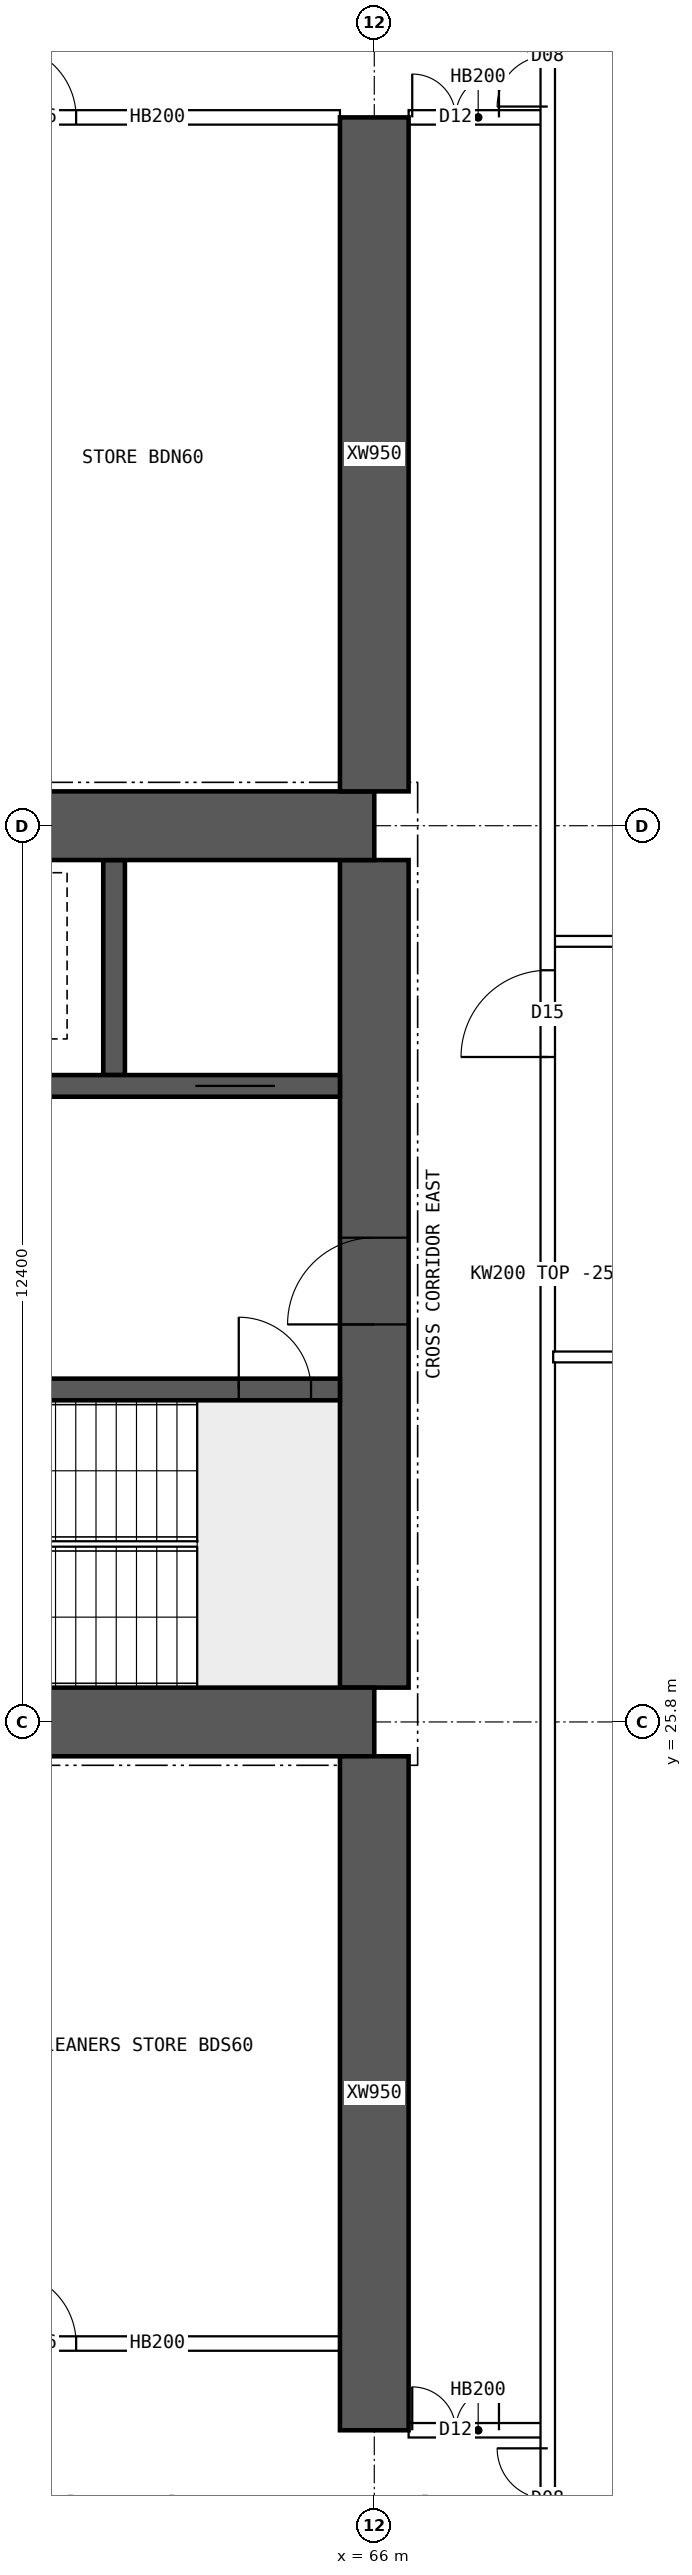
"""IFC4 building model, lengths in metres.
Left out: names, types, materials, properties, quantities, classifications, styles, units other than length and angle.
Written with IfcOpenShell. Run it as: python <this file> out.ifc"""

import sys

from ifc_helpers import new_model, si_unit, direction, frame, frame_2d, origin, place, context, subcontext, project, spatial, polyline, rectangle, outline, extrude, element, fill, save


model = new_model("IFC4")
c1 = context("Model", 3, precision=1e-05, world=origin(), true_north=direction((0.0, 1.0)))
c2 = subcontext(c1, "Body", "Model", "MODEL_VIEW")
j1 = project(units=[si_unit("LENGTHUNIT", "METRE"), si_unit("PLANEANGLEUNIT", "RADIAN")], contexts=[c1])
p1 = place(None, origin())
s1 = spatial("IfcSite", under=j1, at=p1, CompositionType="ELEMENT")
p2 = place(p1, origin())
s2 = spatial("IfcBuilding", under=s1, at=p2, CompositionType="ELEMENT")
p3 = place(p2, frame((0.0, 0.0, 103.15)))
s3 = spatial("IfcBuildingStorey", under=s2, at=p3, CompositionType="ELEMENT", Elevation=103.15)
for number, where, z_axis, x_axis in (
    (1, (18.0, 25.8, 0.0), (0.0, 0.0, 1.0), (1.0, 0.0, 0.0)),
    (2, (18.0, 38.2, 0.0), (0.0, 0.0, 1.0), (1.0, 0.0, 0.0)),
):
    element("IfcWall", number, at=place(p3, frame(where, z_axis=z_axis, x_axis=x_axis)), inside=s3, PredefinedType="SHEAR", context=c2, shape_type="SweptSolid", body=[
        extrude(rectangle(XDim=48.0, YDim=0.95, at=frame_2d((24.0, 0.0))), origin(), (0.0, 0.0, 1.0), 3.75),
    ])
p4 = place(p3, frame((66.0, 26.275, 0.0), z_axis=(0.0, 0.0, 1.0), x_axis=(0.0, 1.0, 0.0)))
e3 = element("IfcWall", 3, at=p4, inside=s3, PredefinedType="SHEAR", context=c2, shape_type="SweptSolid", body=[
    extrude(rectangle(XDim=11.45, YDim=0.95, at=frame_2d((5.725, 0.0))), origin(), (0.0, 0.0, 1.0), 3.75),
])
p5 = place(p4, frame((5.025, 0.0, 0.0)))
e4 = element("IfcOpeningElement", 4, at=p5, cuts=e3, PredefinedType="OPENING", context=c2, shape_type="SweptSolid", body=[
    extrude(rectangle(XDim=1.2, YDim=2.1, at=frame_2d((0.6, 1.05))), frame((0.0, 0.485, 0.0), z_axis=(0.0, -1.0, 0.0), x_axis=(1.0, 0.0, 0.0)), (0.0, 0.0, 1.0), 0.97),
])
p6 = place(p3, frame((18.475, 30.4, 0.0), z_axis=(0.0, 0.0, 1.0), x_axis=(1.0, 0.0, 0.0)))
e5 = element("IfcWall", 5, at=p6, inside=s3, PredefinedType="SHEAR", context=c2, shape_type="SweptSolid", body=[
    extrude(rectangle(XDim=47.05, YDim=0.3, at=frame_2d((23.525, 0.0))), origin(), (0.0, 0.0, 1.0), 3.75),
])
p7 = place(p6, frame((0.4, 0.0, 0.0)))
e6 = element("IfcOpeningElement", 6, at=p7, cuts=e5, PredefinedType="OPENING", context=c2, shape_type="SweptSolid", body=[
    extrude(rectangle(XDim=1.0, YDim=2.1, at=frame_2d((0.5, 1.05))), frame((0.0, 0.16, 0.0), z_axis=(0.0, -1.0, 0.0), x_axis=(1.0, 0.0, 0.0)), (0.0, 0.0, 1.0), 0.32),
])
p8 = place(p6, frame((45.65, 0.0, 0.0)))
e7 = element("IfcOpeningElement", 7, at=p8, cuts=e5, PredefinedType="OPENING", context=c2, shape_type="SweptSolid", body=[
    extrude(rectangle(XDim=1.0, YDim=2.1, at=frame_2d((0.5, 1.05))), frame((0.0, 0.16, 0.0), z_axis=(0.0, -1.0, 0.0), x_axis=(1.0, 0.0, 0.0)), (0.0, 0.0, 1.0), 0.32),
])
p9 = place(p6, frame((8.275, 0.0, 0.0)))
e8 = element("IfcOpeningElement", 8, at=p9, cuts=e5, PredefinedType="OPENING", context=c2, shape_type="SweptSolid", body=[
    extrude(rectangle(XDim=1.1, YDim=2.1, at=frame_2d((0.55, 1.05))), frame((0.0, 0.16, 0.0), z_axis=(0.0, -1.0, 0.0), x_axis=(1.0, 0.0, 0.0)), (0.0, 0.0, 1.0), 0.32),
])
p10 = place(p6, frame((10.875, 0.0, 0.0)))
e9 = element("IfcOpeningElement", 9, at=p10, cuts=e5, PredefinedType="OPENING", context=c2, shape_type="SweptSolid", body=[
    extrude(rectangle(XDim=1.1, YDim=2.1, at=frame_2d((0.55, 1.05))), frame((0.0, 0.16, 0.0), z_axis=(0.0, -1.0, 0.0), x_axis=(1.0, 0.0, 0.0)), (0.0, 0.0, 1.0), 0.32),
])
p11 = place(p6, frame((13.475, 0.0, 0.0)))
e10 = element("IfcOpeningElement", 10, at=p11, cuts=e5, PredefinedType="OPENING", context=c2, shape_type="SweptSolid", body=[
    extrude(rectangle(XDim=1.1, YDim=2.1, at=frame_2d((0.55, 1.05))), frame((0.0, 0.16, 0.0), z_axis=(0.0, -1.0, 0.0), x_axis=(1.0, 0.0, 0.0)), (0.0, 0.0, 1.0), 0.32),
])
p12 = place(p6, frame((16.075, 0.0, 0.0)))
e11 = element("IfcOpeningElement", 11, at=p12, cuts=e5, PredefinedType="OPENING", context=c2, shape_type="SweptSolid", body=[
    extrude(rectangle(XDim=1.1, YDim=2.1, at=frame_2d((0.55, 1.05))), frame((0.0, 0.16, 0.0), z_axis=(0.0, -1.0, 0.0), x_axis=(1.0, 0.0, 0.0)), (0.0, 0.0, 1.0), 0.32),
])
p13 = place(p6, frame((18.85, 0.0, 0.0)))
e12 = element("IfcOpeningElement", 12, at=p13, cuts=e5, PredefinedType="OPENING", context=c2, shape_type="SweptSolid", body=[
    extrude(rectangle(XDim=0.9, YDim=2.1, at=frame_2d((0.45, 1.05))), frame((0.0, 0.16, 0.0), z_axis=(0.0, -1.0, 0.0), x_axis=(1.0, 0.0, 0.0)), (0.0, 0.0, 1.0), 0.32),
])
p14 = place(p6, frame((30.142, 0.0, 0.0)))
e13 = element("IfcOpeningElement", 13, at=p14, cuts=e5, PredefinedType="OPENING", context=c2, shape_type="SweptSolid", body=[
    extrude(rectangle(XDim=1.1, YDim=2.1, at=frame_2d((0.55, 1.05))), frame((0.0, 0.16, 0.0), z_axis=(0.0, -1.0, 0.0), x_axis=(1.0, 0.0, 0.0)), (0.0, 0.0, 1.0), 0.32),
])
p15 = place(p6, frame((33.675, 0.0, 0.0)))
e14 = element("IfcOpeningElement", 14, at=p15, cuts=e5, PredefinedType="OPENING", context=c2, shape_type="SweptSolid", body=[
    extrude(rectangle(XDim=1.1, YDim=2.1, at=frame_2d((0.55, 1.05))), frame((0.0, 0.16, 0.0), z_axis=(0.0, -1.0, 0.0), x_axis=(1.0, 0.0, 0.0)), (0.0, 0.0, 1.0), 0.32),
])
p16 = place(p6, frame((37.208, 0.0, 0.0)))
e15 = element("IfcOpeningElement", 15, at=p16, cuts=e5, PredefinedType="OPENING", context=c2, shape_type="SweptSolid", body=[
    extrude(rectangle(XDim=1.1, YDim=2.1, at=frame_2d((0.55, 1.05))), frame((0.0, 0.16, 0.0), z_axis=(0.0, -1.0, 0.0), x_axis=(1.0, 0.0, 0.0)), (0.0, 0.0, 1.0), 0.32),
])
p17 = place(p3, frame((18.475, 34.6, 0.0), z_axis=(0.0, 0.0, 1.0), x_axis=(1.0, 0.0, 0.0)))
e16 = element("IfcWall", 16, at=p17, inside=s3, PredefinedType="SHEAR", context=c2, shape_type="SweptSolid", body=[
    extrude(rectangle(XDim=47.05, YDim=0.3, at=frame_2d((23.525, 0.0))), origin(), (0.0, 0.0, 1.0), 3.75),
])
p18 = place(p17, frame((0.9, 0.0, 0.0)))
e17 = element("IfcOpeningElement", 17, at=p18, cuts=e16, PredefinedType="OPENING", context=c2, shape_type="SweptSolid", body=[
    extrude(rectangle(XDim=1.1, YDim=2.1, at=frame_2d((0.55, 1.05))), frame((0.0, 0.16, 0.0), z_axis=(0.0, -1.0, 0.0), x_axis=(1.0, 0.0, 0.0)), (0.0, 0.0, 1.0), 0.32),
])
p19 = place(p17, frame((45.05, 0.0, 0.0)))
e18 = element("IfcOpeningElement", 18, at=p19, cuts=e16, PredefinedType="OPENING", context=c2, shape_type="SweptSolid", body=[
    extrude(rectangle(XDim=1.1, YDim=2.1, at=frame_2d((0.55, 1.05))), frame((0.0, 0.16, 0.0), z_axis=(0.0, -1.0, 0.0), x_axis=(1.0, 0.0, 0.0)), (0.0, 0.0, 1.0), 0.32),
])
p20 = place(p17, frame((4.125, 0.0, 0.0)))
e19 = element("IfcOpeningElement", 19, at=p20, cuts=e16, PredefinedType="OPENING", context=c2, shape_type="SweptSolid", body=[
    extrude(rectangle(XDim=0.9, YDim=2.1, at=frame_2d((0.45, 1.05))), frame((0.0, 0.16, 0.0), z_axis=(0.0, -1.0, 0.0), x_axis=(1.0, 0.0, 0.0)), (0.0, 0.0, 1.0), 0.32),
])
p21 = place(p17, frame((42.025, 0.0, 0.0)))
e20 = element("IfcOpeningElement", 20, at=p21, cuts=e16, PredefinedType="OPENING", context=c2, shape_type="SweptSolid", body=[
    extrude(rectangle(XDim=0.9, YDim=2.1, at=frame_2d((0.45, 1.05))), frame((0.0, 0.16, 0.0), z_axis=(0.0, -1.0, 0.0), x_axis=(1.0, 0.0, 0.0)), (0.0, 0.0, 1.0), 0.32),
])
p22 = place(p17, frame((8.9, 0.0, 0.0)))
e21 = element("IfcOpeningElement", 21, at=p22, cuts=e16, PredefinedType="OPENING", context=c2, shape_type="SweptSolid", body=[
    extrude(rectangle(XDim=0.9, YDim=2.1, at=frame_2d((0.45, 1.05))), frame((0.0, 0.16, 0.0), z_axis=(0.0, -1.0, 0.0), x_axis=(1.0, 0.0, 0.0)), (0.0, 0.0, 1.0), 0.32),
])
p23 = place(p17, frame((12.874, 0.0, 0.0)))
e22 = element("IfcOpeningElement", 22, at=p23, cuts=e16, PredefinedType="OPENING", context=c2, shape_type="SweptSolid", body=[
    extrude(rectangle(XDim=0.9, YDim=2.1, at=frame_2d((0.45, 1.05))), frame((0.0, 0.16, 0.0), z_axis=(0.0, -1.0, 0.0), x_axis=(1.0, 0.0, 0.0)), (0.0, 0.0, 1.0), 0.32),
])
p24 = place(p17, frame((16.521, 0.0, 0.0)))
e23 = element("IfcOpeningElement", 23, at=p24, cuts=e16, PredefinedType="OPENING", context=c2, shape_type="SweptSolid", body=[
    extrude(rectangle(XDim=0.9, YDim=2.1, at=frame_2d((0.45, 1.05))), frame((0.0, 0.16, 0.0), z_axis=(0.0, -1.0, 0.0), x_axis=(1.0, 0.0, 0.0)), (0.0, 0.0, 1.0), 0.32),
])
p25 = place(p17, frame((20.28, 0.0, 0.0)))
e24 = element("IfcOpeningElement", 24, at=p25, cuts=e16, PredefinedType="OPENING", context=c2, shape_type="SweptSolid", body=[
    extrude(rectangle(XDim=0.9, YDim=2.1, at=frame_2d((0.45, 1.05))), frame((0.0, 0.16, 0.0), z_axis=(0.0, -1.0, 0.0), x_axis=(1.0, 0.0, 0.0)), (0.0, 0.0, 1.0), 0.32),
])
p26 = place(p17, frame((24.686, 0.0, 0.0)))
e25 = element("IfcOpeningElement", 25, at=p26, cuts=e16, PredefinedType="OPENING", context=c2, shape_type="SweptSolid", body=[
    extrude(rectangle(XDim=0.9, YDim=2.1, at=frame_2d((0.45, 1.05))), frame((0.0, 0.16, 0.0), z_axis=(0.0, -1.0, 0.0), x_axis=(1.0, 0.0, 0.0)), (0.0, 0.0, 1.0), 0.32),
])
p27 = place(p17, frame((27.483, 0.0, 0.0)))
e26 = element("IfcOpeningElement", 26, at=p27, cuts=e16, PredefinedType="OPENING", context=c2, shape_type="SweptSolid", body=[
    extrude(rectangle(XDim=0.9, YDim=2.1, at=frame_2d((0.45, 1.05))), frame((0.0, 0.16, 0.0), z_axis=(0.0, -1.0, 0.0), x_axis=(1.0, 0.0, 0.0)), (0.0, 0.0, 1.0), 0.32),
])
p28 = place(p17, frame((29.653, 0.0, 0.0)))
e27 = element("IfcOpeningElement", 27, at=p28, cuts=e16, PredefinedType="OPENING", context=c2, shape_type="SweptSolid", body=[
    extrude(rectangle(XDim=0.9, YDim=2.1, at=frame_2d((0.45, 1.05))), frame((0.0, 0.16, 0.0), z_axis=(0.0, -1.0, 0.0), x_axis=(1.0, 0.0, 0.0)), (0.0, 0.0, 1.0), 0.32),
])
p29 = place(p17, frame((33.452, 0.0, 0.0)))
e28 = element("IfcOpeningElement", 28, at=p29, cuts=e16, PredefinedType="OPENING", context=c2, shape_type="SweptSolid", body=[
    extrude(rectangle(XDim=0.9, YDim=2.1, at=frame_2d((0.45, 1.05))), frame((0.0, 0.16, 0.0), z_axis=(0.0, -1.0, 0.0), x_axis=(1.0, 0.0, 0.0)), (0.0, 0.0, 1.0), 0.32),
])
p30 = place(p17, frame((37.403, 0.0, 0.0)))
e29 = element("IfcOpeningElement", 29, at=p30, cuts=e16, PredefinedType="OPENING", context=c2, shape_type="SweptSolid", body=[
    extrude(rectangle(XDim=0.9, YDim=2.1, at=frame_2d((0.45, 1.05))), frame((0.0, 0.16, 0.0), z_axis=(0.0, -1.0, 0.0), x_axis=(1.0, 0.0, 0.0)), (0.0, 0.0, 1.0), 0.32),
])
p31 = place(p3, frame((62.4, 34.75, 0.0), z_axis=(0.0, 0.0, 1.0), x_axis=(0.0, 1.0, 0.0)))
e30 = element("IfcWall", 30, at=p31, inside=s3, PredefinedType="SHEAR", context=c2, shape_type="SweptSolid", body=[
    extrude(rectangle(XDim=2.975, YDim=0.3, at=frame_2d((1.488, 0.0))), origin(), (0.0, 0.0, 1.0), 3.75),
])
for number, where, z_axis, x_axis in (
    (31, (66.0, 16.0, 0.0), (0.0, 0.0, 1.0), (0.0, 1.0, 0.0)),
    (32, (66.0, 38.675, 0.0), (0.0, 0.0, 1.0), (0.0, 1.0, 0.0)),
):
    element("IfcWall", number, at=place(p3, frame(where, z_axis=z_axis, x_axis=x_axis)), inside=s3, PredefinedType="SHEAR", context=c2, shape_type="SweptSolid", body=[
        extrude(rectangle(XDim=9.325, YDim=0.95, at=frame_2d((4.663, 0.0))), origin(), (0.0, 0.0, 1.0), 3.75),
    ])
p32 = place(p3, frame((66.475, 16.0, 0.0), z_axis=(0.0, 0.0, 1.0), x_axis=(1.0, 0.0, 0.0)))
e33 = element("IfcWall", 33, at=p32, inside=s3, PredefinedType="SOLIDWALL", context=c2, shape_type="SweptSolid", body=[
    extrude(rectangle(XDim=1.925, YDim=0.2, at=frame_2d((0.962, 0.0))), origin(), (0.0, 0.0, 1.0), 3.5),
])
p33 = place(p32, frame((0.05, 0.0, 0.0)))
e34 = element("IfcOpeningElement", 34, at=p33, cuts=e33, PredefinedType="OPENING", context=c2, shape_type="SweptSolid", body=[
    extrude(rectangle(XDim=1.2, YDim=2.1, at=frame_2d((0.6, 1.05))), frame((0.0, 0.11, 0.0), z_axis=(0.0, -1.0, 0.0), x_axis=(1.0, 0.0, 0.0)), (0.0, 0.0, 1.0), 0.22),
])
p34 = place(p3, frame((60.475, 48.0, 0.0), z_axis=(0.0, 0.0, 1.0), x_axis=(1.0, 0.0, 0.0)))
e35 = element("IfcWall", 35, at=p34, inside=s3, PredefinedType="SOLIDWALL", context=c2, shape_type="SweptSolid", body=[
    extrude(rectangle(XDim=5.05, YDim=0.2, at=frame_2d((2.525, 0.0))), origin(), (0.0, 0.0, 1.0), 3.5),
])
p35 = place(p34, frame((0.4, 0.0, 0.0)))
e36 = element("IfcOpeningElement", 36, at=p35, cuts=e35, PredefinedType="OPENING", context=c2, shape_type="SweptSolid", body=[
    extrude(rectangle(XDim=1.0, YDim=2.1, at=frame_2d((0.5, 1.05))), frame((0.0, 0.11, 0.0), z_axis=(0.0, -1.0, 0.0), x_axis=(1.0, 0.0, 0.0)), (0.0, 0.0, 1.0), 0.22),
])
p36 = place(p3, frame((66.475, 48.0, 0.0), z_axis=(0.0, 0.0, 1.0), x_axis=(1.0, 0.0, 0.0)))
e37 = element("IfcWall", 37, at=p36, inside=s3, PredefinedType="SOLIDWALL", context=c2, shape_type="SweptSolid", body=[
    extrude(rectangle(XDim=1.925, YDim=0.2, at=frame_2d((0.962, 0.0))), origin(), (0.0, 0.0, 1.0), 3.5),
])
p37 = place(p36, frame((0.05, 0.0, 0.0)))
e38 = element("IfcOpeningElement", 38, at=p37, cuts=e37, PredefinedType="OPENING", context=c2, shape_type="SweptSolid", body=[
    extrude(rectangle(XDim=1.2, YDim=2.1, at=frame_2d((0.6, 1.05))), frame((0.0, 0.11, 0.0), z_axis=(0.0, -1.0, 0.0), x_axis=(1.0, 0.0, 0.0)), (0.0, 0.0, 1.0), 0.22),
])
p38 = place(p3, frame((60.475, 17.2, 0.0), z_axis=(0.0, 0.0, 1.0), x_axis=(1.0, 0.0, 0.0)))
e39 = element("IfcWall", 39, at=p38, inside=s3, PredefinedType="SOLIDWALL", context=c2, shape_type="SweptSolid", body=[
    extrude(rectangle(XDim=5.05, YDim=0.2, at=frame_2d((2.525, 0.0))), origin(), (0.0, 0.0, 1.0), 3.5),
])
p39 = place(p38, frame((0.4, 0.0, 0.0)))
e40 = element("IfcOpeningElement", 40, at=p39, cuts=e39, PredefinedType="OPENING", context=c2, shape_type="SweptSolid", body=[
    extrude(rectangle(XDim=1.0, YDim=2.1, at=frame_2d((0.5, 1.05))), frame((0.0, 0.11, 0.0), z_axis=(0.0, -1.0, 0.0), x_axis=(1.0, 0.0, 0.0)), (0.0, 0.0, 1.0), 0.22),
])
p40 = place(p3, frame((68.475, 30.85, 0.0), z_axis=(0.0, 0.0, 1.0), x_axis=(1.0, 0.0, 0.0)))
e41 = element("IfcWall", 41, at=p40, inside=s3, PredefinedType="PARTITIONING", context=c2, shape_type="SweptSolid", body=[
    extrude(outline(polyline([(0.0, 0.0), (6.82, 0.0), (6.82, 3.5), (3.827, 3.5), (3.825, 3.05), (3.227, 3.05), (3.225, 3.5), (0.0, 3.5), (0.0, 0.0)])), frame((0.0, 0.075, 0.0), z_axis=(0.0, -1.0, 0.0), x_axis=(1.0, 0.0, 0.0)), (0.0, 0.0, 1.0), 0.15),
])
p41 = place(p3, frame((68.4, 9.405, 0.0), z_axis=(0.0, 0.0, 1.0), x_axis=(0.0, 1.0, 0.0)))
e42 = element("IfcWall", 42, at=p41, inside=s3, PredefinedType="SOLIDWALL", context=c2, shape_type="SweptSolid", body=[
    extrude(rectangle(XDim=45.189, YDim=0.2, at=frame_2d((22.595, 0.0))), origin(), (0.0, 0.0, 1.0), 3.5),
])
p42 = place(p41, frame((25.595, 0.0, 0.0)))
e43 = element("IfcOpeningElement", 43, at=p42, cuts=e42, PredefinedType="OPENING", context=c2, shape_type="SweptSolid", body=[
    extrude(rectangle(XDim=1.2, YDim=2.1, at=frame_2d((0.6, 1.05))), frame((0.0, 0.11, 0.0), z_axis=(0.0, -1.0, 0.0), x_axis=(1.0, 0.0, 0.0)), (0.0, 0.0, 1.0), 0.22),
])
p43 = place(p41, frame((4.945, 0.0, 0.0)))
e44 = element("IfcOpeningElement", 44, at=p43, cuts=e42, PredefinedType="OPENING", context=c2, shape_type="SweptSolid", body=[
    extrude(rectangle(XDim=1.4, YDim=2.1, at=frame_2d((0.7, 1.05))), frame((0.0, 0.11, 0.0), z_axis=(0.0, -1.0, 0.0), x_axis=(1.0, 0.0, 0.0)), (0.0, 0.0, 1.0), 0.22),
])
p44 = place(p41, frame((38.745, 0.0, 0.0)))
e45 = element("IfcOpeningElement", 45, at=p44, cuts=e42, PredefinedType="OPENING", context=c2, shape_type="SweptSolid", body=[
    extrude(rectangle(XDim=1.4, YDim=2.1, at=frame_2d((0.7, 1.05))), frame((0.0, 0.11, 0.0), z_axis=(0.0, -1.0, 0.0), x_axis=(1.0, 0.0, 0.0)), (0.0, 0.0, 1.0), 0.22),
])
p45 = place(p3, frame((68.475, 36.6, 0.0), z_axis=(0.0, 0.0, 1.0), x_axis=(1.0, 0.0, 0.0)))
e46 = element("IfcWall", 46, at=p45, inside=s3, PredefinedType="PARTITIONING", context=c2, shape_type="SweptSolid", body=[
    extrude(rectangle(XDim=6.82, YDim=0.15, at=frame_2d((3.41, 0.0))), origin(), (0.0, 0.0, 1.0), 3.5),
])
p46 = place(p5, origin())
e47 = element("IfcDoor", 47, at=p46, inside=s3, OperationType="SINGLE_SWING_LEFT", PredefinedType="DOOR", context=c2, shape_type="SweptSolid", body=[
    extrude(rectangle(XDim=1.2, YDim=2.1, at=frame_2d((0.6, 1.05))), frame((0.0, 0.025, 0.0), z_axis=(0.0, -1.0, 0.0), x_axis=(1.0, 0.0, 0.0)), (0.0, 0.0, 1.0), 0.05),
])
fill(e4, e47)
p47 = place(p8, origin())
e48 = element("IfcDoor", 48, at=p47, inside=s3, OperationType="SINGLE_SWING_LEFT", PredefinedType="DOOR", context=c2, shape_type="SweptSolid", body=[
    extrude(rectangle(XDim=1.0, YDim=2.1, at=frame_2d((0.5, 1.05))), frame((0.0, 0.025, 0.0), z_axis=(0.0, -1.0, 0.0), x_axis=(1.0, 0.0, 0.0)), (0.0, 0.0, 1.0), 0.05),
])
fill(e7, e48)
p48 = place(p19, origin())
e49 = element("IfcDoor", 49, at=p48, inside=s3, OperationType="DOUBLE_DOOR_SLIDING", PredefinedType="DOOR", context=c2, shape_type="SweptSolid", body=[
    extrude(rectangle(XDim=1.1, YDim=2.1, at=frame_2d((0.55, 1.05))), frame((0.0, 0.025, 0.0), z_axis=(0.0, -1.0, 0.0), x_axis=(1.0, 0.0, 0.0)), (0.0, 0.0, 1.0), 0.05),
])
fill(e18, e49)
p49 = place(p33, origin())
e50 = element("IfcDoor", 50, at=p49, inside=s3, OperationType="DOUBLE_DOOR_SINGLE_SWING", PredefinedType="DOOR", context=c2, shape_type="SweptSolid", body=[
    extrude(rectangle(XDim=1.2, YDim=2.1, at=frame_2d((0.6, 1.05))), frame((0.0, 0.025, 0.0), z_axis=(0.0, -1.0, 0.0), x_axis=(1.0, 0.0, 0.0)), (0.0, 0.0, 1.0), 0.05),
])
fill(e34, e50)
p50 = place(p37, origin())
e51 = element("IfcDoor", 51, at=p50, inside=s3, OperationType="DOUBLE_DOOR_SINGLE_SWING", PredefinedType="DOOR", context=c2, shape_type="SweptSolid", body=[
    extrude(rectangle(XDim=1.2, YDim=2.1, at=frame_2d((0.6, 1.05))), frame((0.0, 0.025, 0.0), z_axis=(0.0, -1.0, 0.0), x_axis=(1.0, 0.0, 0.0)), (0.0, 0.0, 1.0), 0.05),
])
fill(e38, e51)
p51 = place(p39, origin())
e52 = element("IfcDoor", 52, at=p51, inside=s3, OperationType="SINGLE_SWING_LEFT", PredefinedType="DOOR", context=c2, shape_type="SweptSolid", body=[
    extrude(rectangle(XDim=1.0, YDim=2.1, at=frame_2d((0.5, 1.05))), frame((0.0, 0.025, 0.0), z_axis=(0.0, -1.0, 0.0), x_axis=(1.0, 0.0, 0.0)), (0.0, 0.0, 1.0), 0.05),
])
fill(e40, e52)
p52 = place(p35, origin())
e53 = element("IfcDoor", 53, at=p52, inside=s3, OperationType="SINGLE_SWING_LEFT", PredefinedType="DOOR", context=c2, shape_type="SweptSolid", body=[
    extrude(rectangle(XDim=1.0, YDim=2.1, at=frame_2d((0.5, 1.05))), frame((0.0, 0.025, 0.0), z_axis=(0.0, -1.0, 0.0), x_axis=(1.0, 0.0, 0.0)), (0.0, 0.0, 1.0), 0.05),
])
fill(e36, e53)
p53 = place(p42, origin())
e54 = element("IfcDoor", 54, at=p53, inside=s3, OperationType="SINGLE_SWING_LEFT", PredefinedType="DOOR", context=c2, shape_type="SweptSolid", body=[
    extrude(rectangle(XDim=1.2, YDim=2.1, at=frame_2d((0.6, 1.05))), frame((0.0, 0.025, 0.0), z_axis=(0.0, -1.0, 0.0), x_axis=(1.0, 0.0, 0.0)), (0.0, 0.0, 1.0), 0.05),
])
fill(e43, e54)
p54 = place(p43, origin())
e55 = element("IfcDoor", 55, at=p54, inside=s3, OperationType="DOUBLE_DOOR_SINGLE_SWING", PredefinedType="DOOR", context=c2, shape_type="SweptSolid", body=[
    extrude(rectangle(XDim=1.4, YDim=2.1, at=frame_2d((0.7, 1.05))), frame((0.0, 0.025, 0.0), z_axis=(0.0, -1.0, 0.0), x_axis=(1.0, 0.0, 0.0)), (0.0, 0.0, 1.0), 0.05),
])
fill(e44, e55)
p55 = place(p44, origin())
e56 = element("IfcDoor", 56, at=p55, inside=s3, OperationType="DOUBLE_DOOR_SINGLE_SWING", PredefinedType="DOOR", context=c2, shape_type="SweptSolid", body=[
    extrude(rectangle(XDim=1.4, YDim=2.1, at=frame_2d((0.7, 1.05))), frame((0.0, 0.025, 0.0), z_axis=(0.0, -1.0, 0.0), x_axis=(1.0, 0.0, 0.0)), (0.0, 0.0, 1.0), 0.05),
])
fill(e45, e56)
save(model, sys.argv[1])
